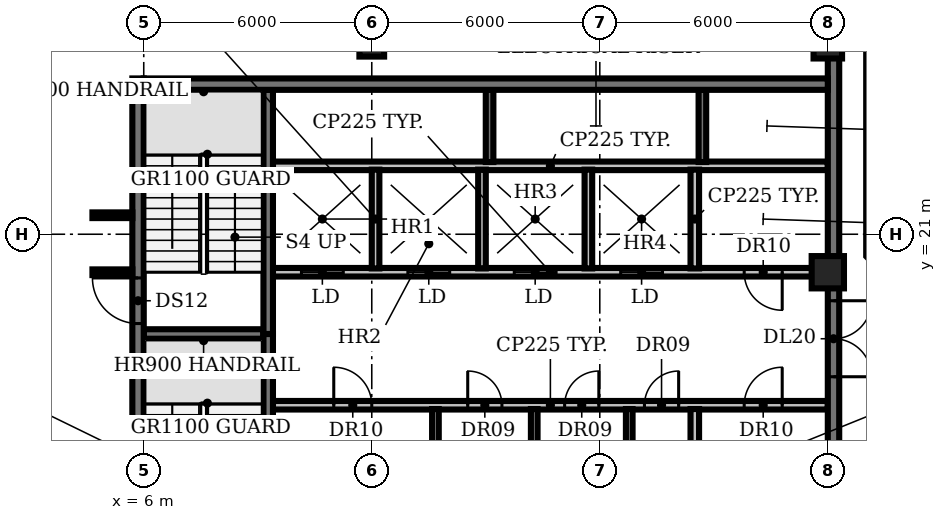
"""IFC4 building model, lengths in metres.
Left out: names, types, materials, properties, quantities, classifications, styles, units other than length and angle.
Written with IfcOpenShell. Run it as: python <this file> out.ifc"""

import sys

from ifc_helpers import new_model, si_unit, direction, frame, frame_2d, origin, origin_2d, place, context, subcontext, project, spatial, rectangle, circle, extrude, element, fill, save


model = new_model("IFC4")
c1 = context("Model", 3, precision=1e-05, world=origin(), true_north=direction((0.0, 1.0)))
c2 = subcontext(c1, "Body", "Model", "MODEL_VIEW")
j1 = project(units=[si_unit("LENGTHUNIT", "METRE"), si_unit("PLANEANGLEUNIT", "RADIAN")], contexts=[c1])
p1 = place(None, origin())
s1 = spatial("IfcSite", under=j1, at=p1, CompositionType="ELEMENT")
p2 = place(p1, origin())
s2 = spatial("IfcBuilding", under=s1, at=p2, CompositionType="ELEMENT")
p3 = place(p2, frame((0.0, 0.0, 276.8)))
s3 = spatial("IfcBuildingStorey", under=s2, at=p3, CompositionType="ELEMENT", Elevation=276.8)
p4 = place(p3, frame((12.0, 26.0, 0.0), z_axis=(0.0, 0.0, 1.0), x_axis=(1.0, 0.0, 0.0)))
e1 = element("IfcColumn", 1, at=p4, inside=s3, PredefinedType="COLUMN", context=c2, shape_type="SweptSolid", body=[
    extrude(rectangle(XDim=0.65, YDim=0.65, at=origin_2d()), origin(), (0.0, 0.0, 1.0), 3.85),
])
p5 = place(p3, frame((24.0, 20.0, 0.0), z_axis=(0.0, 0.0, 1.0), x_axis=(1.0, 0.0, 0.0)))
e2 = element("IfcColumn", 2, at=p5, inside=s3, PredefinedType="COLUMN", context=c2, shape_type="SweptSolid", body=[
    extrude(circle(Radius=0.425, at=origin_2d()), origin(), (0.0, 0.0, 1.0), 3.85),
])
p6 = place(p3, frame((24.0, 26.0, 0.0), z_axis=(0.0, 0.0, 1.0), x_axis=(1.0, 0.0, 0.0)))
e3 = element("IfcColumn", 3, at=p6, inside=s3, PredefinedType="COLUMN", context=c2, shape_type="SweptSolid", body=[
    extrude(rectangle(XDim=0.75, YDim=0.75, at=origin_2d()), origin(), (0.0, 0.0, 1.0), 3.85),
])
p7 = place(p3, frame((9.4, 16.5, 0.0), z_axis=(0.0, 0.0, 1.0), x_axis=(1.0, 0.0, 0.0)))
e4 = element("IfcWall", 4, at=p7, inside=s3, PredefinedType="PARTITIONING", context=c2, shape_type="SweptSolid", body=[
    extrude(rectangle(XDim=14.6, YDim=0.225, at=frame_2d((7.3, 0.0))), origin(), (0.0, 0.0, 1.0), 3.85),
])
p8 = place(p7, frame((1.6, 0.0, 0.0)))
e5 = element("IfcOpeningElement", 5, at=p8, cuts=e4, PredefinedType="OPENING", context=c2, shape_type="SweptSolid", body=[
    extrude(rectangle(XDim=1.0, YDim=2.1, at=frame_2d((0.5, 1.05))), frame((0.0, 0.123, 0.0), z_axis=(0.0, -1.0, 0.0), x_axis=(1.0, 0.0, 0.0)), (0.0, 0.0, 1.0), 0.245),
])
p9 = place(p7, frame((5.125, 0.0, 0.0)))
e6 = element("IfcOpeningElement", 6, at=p9, cuts=e4, PredefinedType="OPENING", context=c2, shape_type="SweptSolid", body=[
    extrude(rectangle(XDim=0.9, YDim=2.1, at=frame_2d((0.45, 1.05))), frame((0.0, 0.123, 0.0), z_axis=(0.0, -1.0, 0.0), x_axis=(1.0, 0.0, 0.0)), (0.0, 0.0, 1.0), 0.245),
])
p10 = place(p7, frame((7.675, 0.0, 0.0)))
e7 = element("IfcOpeningElement", 7, at=p10, cuts=e4, PredefinedType="OPENING", context=c2, shape_type="SweptSolid", body=[
    extrude(rectangle(XDim=0.9, YDim=2.1, at=frame_2d((0.45, 1.05))), frame((0.0, 0.123, 0.0), z_axis=(0.0, -1.0, 0.0), x_axis=(1.0, 0.0, 0.0)), (0.0, 0.0, 1.0), 0.245),
])
p11 = place(p7, frame((9.775, 0.0, 0.0)))
e8 = element("IfcOpeningElement", 8, at=p11, cuts=e4, PredefinedType="OPENING", context=c2, shape_type="SweptSolid", body=[
    extrude(rectangle(XDim=0.9, YDim=2.1, at=frame_2d((0.45, 1.05))), frame((0.0, 0.123, 0.0), z_axis=(0.0, -1.0, 0.0), x_axis=(1.0, 0.0, 0.0)), (0.0, 0.0, 1.0), 0.245),
])
p12 = place(p7, frame((12.4, 0.0, 0.0)))
e9 = element("IfcOpeningElement", 9, at=p12, cuts=e4, PredefinedType="OPENING", context=c2, shape_type="SweptSolid", body=[
    extrude(rectangle(XDim=1.0, YDim=2.1, at=frame_2d((0.5, 1.05))), frame((0.0, 0.123, 0.0), z_axis=(0.0, -1.0, 0.0), x_axis=(1.0, 0.0, 0.0)), (0.0, 0.0, 1.0), 0.245),
])
p13 = place(p3, frame((6.0, 18.375, 0.0), z_axis=(0.0, 0.0, 1.0), x_axis=(1.0, 0.0, 0.0)))
e10 = element("IfcWall", 10, at=p13, inside=s3, PredefinedType="SHEAR", context=c2, shape_type="SweptSolid", body=[
    extrude(rectangle(XDim=3.15, YDim=0.25, at=frame_2d((1.575, 0.0))), origin(), (0.0, 0.0, 1.0), 3.85),
])
p14 = place(p3, frame((24.0, 20.0, 0.0), z_axis=(0.0, 0.0, 1.0), x_axis=(-1.0, 0.0, 0.0)))
e11 = element("IfcWall", 11, at=p14, inside=s3, PredefinedType="PARTITIONING", context=c2, shape_type="SweptSolid", body=[
    extrude(rectangle(XDim=14.6, YDim=0.225, at=frame_2d((7.3, 0.0))), origin(), (0.0, 0.0, 1.0), 3.85),
])
p15 = place(p14, frame((12.75, 0.0, 0.0)))
e12 = element("IfcOpeningElement", 12, at=p15, cuts=e11, PredefinedType="OPENING", context=c2, shape_type="SweptSolid", body=[
    extrude(rectangle(XDim=1.1, YDim=2.1, at=frame_2d((0.55, 1.05))), frame((0.0, 0.123, 0.0), z_axis=(0.0, -1.0, 0.0), x_axis=(1.0, 0.0, 0.0)), (0.0, 0.0, 1.0), 0.245),
])
p16 = place(p14, frame((9.95, 0.0, 0.0)))
e13 = element("IfcOpeningElement", 13, at=p16, cuts=e11, PredefinedType="OPENING", context=c2, shape_type="SweptSolid", body=[
    extrude(rectangle(XDim=1.1, YDim=2.1, at=frame_2d((0.55, 1.05))), frame((0.0, 0.123, 0.0), z_axis=(0.0, -1.0, 0.0), x_axis=(1.0, 0.0, 0.0)), (0.0, 0.0, 1.0), 0.245),
])
p17 = place(p14, frame((7.15, 0.0, 0.0)))
e14 = element("IfcOpeningElement", 14, at=p17, cuts=e11, PredefinedType="OPENING", context=c2, shape_type="SweptSolid", body=[
    extrude(rectangle(XDim=1.1, YDim=2.1, at=frame_2d((0.55, 1.05))), frame((0.0, 0.123, 0.0), z_axis=(0.0, -1.0, 0.0), x_axis=(1.0, 0.0, 0.0)), (0.0, 0.0, 1.0), 0.245),
])
p18 = place(p14, frame((4.35, 0.0, 0.0)))
e15 = element("IfcOpeningElement", 15, at=p18, cuts=e11, PredefinedType="OPENING", context=c2, shape_type="SweptSolid", body=[
    extrude(rectangle(XDim=1.1, YDim=2.1, at=frame_2d((0.55, 1.05))), frame((0.0, 0.123, 0.0), z_axis=(0.0, -1.0, 0.0), x_axis=(1.0, 0.0, 0.0)), (0.0, 0.0, 1.0), 0.245),
])
p19 = place(p14, frame((1.2, 0.0, 0.0)))
e16 = element("IfcOpeningElement", 16, at=p19, cuts=e11, PredefinedType="OPENING", context=c2, shape_type="SweptSolid", body=[
    extrude(rectangle(XDim=1.0, YDim=2.1, at=frame_2d((0.5, 1.05))), frame((0.0, 0.123, 0.0), z_axis=(0.0, -1.0, 0.0), x_axis=(1.0, 0.0, 0.0)), (0.0, 0.0, 1.0), 0.245),
])
p20 = place(p3, frame((9.4, 22.8, 0.0), z_axis=(0.0, 0.0, 1.0), x_axis=(1.0, 0.0, 0.0)))
e17 = element("IfcWall", 17, at=p20, inside=s3, PredefinedType="PARTITIONING", context=c2, shape_type="SweptSolid", body=[
    extrude(rectangle(XDim=14.6, YDim=0.225, at=frame_2d((7.3, 0.0))), origin(), (0.0, 0.0, 1.0), 3.85),
])
p21 = place(p3, frame((9.275, 18.375, 0.0), z_axis=(0.0, 0.0, 1.0), x_axis=(0.0, -1.0, 0.0)))
e18 = element("IfcWall", 18, at=p21, inside=s3, PredefinedType="SHEAR", context=c2, shape_type="SweptSolid", body=[
    extrude(rectangle(XDim=6.55, YDim=0.25, at=frame_2d((3.275, 0.0))), origin(), (0.0, 0.0, 1.0), 3.85),
])
p22 = place(p21, frame((5.075, 0.0, 0.0)))
e19 = element("IfcOpeningElement", 19, at=p22, cuts=e18, PredefinedType="OPENING", context=c2, shape_type="SweptSolid", body=[
    extrude(rectangle(XDim=1.0, YDim=2.1, at=frame_2d((0.5, 1.05))), frame((0.0, 0.135, 0.0), z_axis=(0.0, -1.0, 0.0), x_axis=(1.0, 0.0, 0.0)), (0.0, 0.0, 1.0), 0.27),
])
p23 = place(p3, frame((9.275, 18.375, 0.0), z_axis=(0.0, 0.0, 1.0), x_axis=(0.0, 1.0, 0.0)))
e20 = element("IfcWall", 20, at=p23, inside=s3, PredefinedType="SHEAR", context=c2, shape_type="SweptSolid", body=[
    extrude(rectangle(XDim=6.425, YDim=0.25, at=frame_2d((3.212, 0.0))), origin(), (0.0, 0.0, 1.0), 3.85),
])
p24 = place(p3, frame((12.1, 20.1, 0.0), z_axis=(0.0, 0.0, 1.0), x_axis=(0.0, 1.0, 0.0)))
e21 = element("IfcWall", 21, at=p24, inside=s3, PredefinedType="SOLIDWALL", context=c2, shape_type="SweptSolid", body=[
    extrude(rectangle(XDim=2.6, YDim=0.2, at=frame_2d((1.3, 0.0))), origin(), (0.0, 0.0, 1.0), 3.85),
])
p25 = place(p3, frame((13.675, 13.8, 0.0), z_axis=(0.0, 0.0, 1.0), x_axis=(0.0, 1.0, 0.0)))
e22 = element("IfcWall", 22, at=p25, inside=s3, PredefinedType="PARTITIONING", context=c2, shape_type="SweptSolid", body=[
    extrude(rectangle(XDim=2.6, YDim=0.175, at=frame_2d((1.3, 0.0))), origin(), (0.0, 0.0, 1.0), 3.85),
])
p26 = place(p3, frame((14.9, 20.1, 0.0), z_axis=(0.0, 0.0, 1.0), x_axis=(0.0, 1.0, 0.0)))
e23 = element("IfcWall", 23, at=p26, inside=s3, PredefinedType="SOLIDWALL", context=c2, shape_type="SweptSolid", body=[
    extrude(rectangle(XDim=2.6, YDim=0.2, at=frame_2d((1.3, 0.0))), origin(), (0.0, 0.0, 1.0), 3.85),
])
p27 = place(p3, frame((15.1, 22.9, 0.0), z_axis=(0.0, 0.0, 1.0), x_axis=(0.0, 1.0, 0.0)))
e24 = element("IfcWall", 24, at=p27, inside=s3, PredefinedType="SHEAR", context=c2, shape_type="SweptSolid", body=[
    extrude(rectangle(XDim=1.9, YDim=0.2, at=frame_2d((0.95, 0.0))), origin(), (0.0, 0.0, 1.0), 3.85),
])
p28 = place(p3, frame((16.275, 13.8, 0.0), z_axis=(0.0, 0.0, 1.0), x_axis=(0.0, 1.0, 0.0)))
e25 = element("IfcWall", 25, at=p28, inside=s3, PredefinedType="PARTITIONING", context=c2, shape_type="SweptSolid", body=[
    extrude(rectangle(XDim=2.6, YDim=0.175, at=frame_2d((1.3, 0.0))), origin(), (0.0, 0.0, 1.0), 3.85),
])
p29 = place(p3, frame((17.7, 20.1, 0.0), z_axis=(0.0, 0.0, 1.0), x_axis=(0.0, 1.0, 0.0)))
e26 = element("IfcWall", 26, at=p29, inside=s3, PredefinedType="SOLIDWALL", context=c2, shape_type="SweptSolid", body=[
    extrude(rectangle(XDim=2.6, YDim=0.2, at=frame_2d((1.3, 0.0))), origin(), (0.0, 0.0, 1.0), 3.85),
])
p30 = place(p3, frame((18.775, 13.8, 0.0), z_axis=(0.0, 0.0, 1.0), x_axis=(0.0, 1.0, 0.0)))
e27 = element("IfcWall", 27, at=p30, inside=s3, PredefinedType="PARTITIONING", context=c2, shape_type="SweptSolid", body=[
    extrude(rectangle(XDim=2.6, YDim=0.175, at=frame_2d((1.3, 0.0))), origin(), (0.0, 0.0, 1.0), 3.85),
])
for number, where, z_axis, x_axis in (
    (28, (20.5, 13.8, 0.0), (0.0, 0.0, 1.0), (0.0, 1.0, 0.0)),
    (29, (20.5, 20.1, 0.0), (0.0, 0.0, 1.0), (0.0, 1.0, 0.0)),
):
    element("IfcWall", number, at=place(p3, frame(where, z_axis=z_axis, x_axis=x_axis)), inside=s3, PredefinedType="PARTITIONING", context=c2, shape_type="SweptSolid", body=[
        extrude(rectangle(XDim=2.6, YDim=0.225, at=frame_2d((1.3, 0.0))), origin(), (0.0, 0.0, 1.0), 3.85),
    ])
p31 = place(p3, frame((20.7, 22.9, 0.0), z_axis=(0.0, 0.0, 1.0), x_axis=(0.0, 1.0, 0.0)))
e30 = element("IfcWall", 30, at=p31, inside=s3, PredefinedType="SHEAR", context=c2, shape_type="SweptSolid", body=[
    extrude(rectangle(XDim=1.9, YDim=0.2, at=frame_2d((0.95, 0.0))), origin(), (0.0, 0.0, 1.0), 3.85),
])
p32 = place(p3, frame((5.85, 5.1, 0.0), z_axis=(0.0, 0.0, 1.0), x_axis=(0.0, 1.0, 0.0)))
e31 = element("IfcWall", 31, at=p32, inside=s3, PredefinedType="SHEAR", context=c2, shape_type="SweptSolid", body=[
    extrude(rectangle(XDim=20.0, YDim=0.3, at=frame_2d((10.0, 0.0))), origin(), (0.0, 0.0, 1.0), 3.85),
])
p33 = place(p32, frame((0.55, 0.0, 0.0)))
e32 = element("IfcOpeningElement", 32, at=p33, cuts=e31, PredefinedType="OPENING", context=c2, shape_type="SweptSolid", body=[
    extrude(rectangle(XDim=1.5, YDim=2.1, at=frame_2d((0.75, 1.05))), frame((0.0, 0.16, 0.0), z_axis=(0.0, -1.0, 0.0), x_axis=(1.0, 0.0, 0.0)), (0.0, 0.0, 1.0), 0.32),
])
p34 = place(p32, frame((7.0, 0.0, 0.0)))
e33 = element("IfcOpeningElement", 33, at=p34, cuts=e31, PredefinedType="OPENING", context=c2, shape_type="SweptSolid", body=[
    extrude(rectangle(XDim=1.2, YDim=2.1, at=frame_2d((0.6, 1.05))), frame((0.0, 0.16, 0.0), z_axis=(0.0, -1.0, 0.0), x_axis=(1.0, 0.0, 0.0)), (0.0, 0.0, 1.0), 0.32),
])
p35 = place(p32, frame((13.55, 0.0, 0.0)))
e34 = element("IfcOpeningElement", 34, at=p35, cuts=e31, PredefinedType="OPENING", context=c2, shape_type="SweptSolid", body=[
    extrude(rectangle(XDim=1.2, YDim=2.1, at=frame_2d((0.6, 1.05))), frame((0.0, 0.16, 0.0), z_axis=(0.0, -1.0, 0.0), x_axis=(1.0, 0.0, 0.0)), (0.0, 0.0, 1.0), 0.32),
])
p36 = place(p3, frame((24.15, 25.655, 0.0), z_axis=(0.0, 0.0, 1.0), x_axis=(0.0, -1.0, 0.0)))
e35 = element("IfcWall", 35, at=p36, inside=s3, PredefinedType="SHEAR", context=c2, shape_type="SweptSolid", body=[
    extrude(rectangle(XDim=20.555, YDim=0.3, at=frame_2d((10.277, 0.0))), origin(), (0.0, 0.0, 1.0), 3.85),
])
p37 = place(p36, frame((18.505, 0.0, 0.0)))
e36 = element("IfcOpeningElement", 36, at=p37, cuts=e35, PredefinedType="OPENING", context=c2, shape_type="SweptSolid", body=[
    extrude(rectangle(XDim=1.5, YDim=2.1, at=frame_2d((0.75, 1.05))), frame((0.0, 0.16, 0.0), z_axis=(0.0, -1.0, 0.0), x_axis=(1.0, 0.0, 0.0)), (0.0, 0.0, 1.0), 0.32),
])
p38 = place(p36, frame((12.405, 0.0, 0.0)))
e37 = element("IfcOpeningElement", 37, at=p38, cuts=e35, PredefinedType="OPENING", context=c2, shape_type="SweptSolid", body=[
    extrude(rectangle(XDim=0.9, YDim=2.1, at=frame_2d((0.45, 1.05))), frame((0.0, 0.16, 0.0), z_axis=(0.0, -1.0, 0.0), x_axis=(1.0, 0.0, 0.0)), (0.0, 0.0, 1.0), 0.32),
])
p39 = place(p36, frame((6.405, 0.0, 0.0)))
e38 = element("IfcOpeningElement", 38, at=p39, cuts=e35, PredefinedType="OPENING", context=c2, shape_type="SweptSolid", body=[
    extrude(rectangle(XDim=2.0, YDim=2.1, at=frame_2d((1.0, 1.05))), frame((0.0, 0.16, 0.0), z_axis=(0.0, -1.0, 0.0), x_axis=(1.0, 0.0, 0.0)), (0.0, 0.0, 1.0), 0.32),
])
p40 = place(p3, frame((6.0, 24.95, 0.0), z_axis=(0.0, 0.0, 1.0), x_axis=(1.0, 0.0, 0.0)))
e39 = element("IfcWall", 39, at=p40, inside=s3, PredefinedType="SHEAR", context=c2, shape_type="SweptSolid", body=[
    extrude(rectangle(XDim=18.0, YDim=0.3, at=frame_2d((9.0, 0.0))), origin(), (0.0, 0.0, 1.0), 3.85),
])
for number, where, z_axis, x_axis in (
    (40, (4.65, 20.0, 0.0), (0.0, 0.0, 1.0), (1.0, 0.0, 0.0)),
    (41, (4.65, 21.5, 0.0), (0.0, 0.0, 1.0), (1.0, 0.0, 0.0)),
):
    element("IfcWall", number, at=place(p3, frame(where, z_axis=z_axis, x_axis=x_axis)), inside=s3, PredefinedType="PARTITIONING", context=c2, shape_type="SweptSolid", body=[
        extrude(rectangle(XDim=1.05, YDim=0.15, at=frame_2d((0.525, 0.0))), origin(), (0.0, 0.0, 1.0), 2.9),
    ])
p41 = place(p8, origin())
e42 = element("IfcDoor", 42, at=p41, inside=s3, OperationType="SINGLE_SWING_LEFT", PredefinedType="DOOR", context=c2, shape_type="SweptSolid", body=[
    extrude(rectangle(XDim=1.0, YDim=2.1, at=frame_2d((0.5, 1.05))), frame((0.0, 0.025, 0.0), z_axis=(0.0, -1.0, 0.0), x_axis=(1.0, 0.0, 0.0)), (0.0, 0.0, 1.0), 0.05),
])
fill(e5, e42)
p42 = place(p9, origin())
e43 = element("IfcDoor", 43, at=p42, inside=s3, OperationType="SINGLE_SWING_LEFT", PredefinedType="DOOR", context=c2, shape_type="SweptSolid", body=[
    extrude(rectangle(XDim=0.9, YDim=2.1, at=frame_2d((0.45, 1.05))), frame((0.0, 0.025, 0.0), z_axis=(0.0, -1.0, 0.0), x_axis=(1.0, 0.0, 0.0)), (0.0, 0.0, 1.0), 0.05),
])
fill(e6, e43)
p43 = place(p10, origin())
e44 = element("IfcDoor", 44, at=p43, inside=s3, OperationType="SINGLE_SWING_RIGHT", PredefinedType="DOOR", context=c2, shape_type="SweptSolid", body=[
    extrude(rectangle(XDim=0.9, YDim=2.1, at=frame_2d((0.45, 1.05))), frame((0.0, 0.025, 0.0), z_axis=(0.0, -1.0, 0.0), x_axis=(1.0, 0.0, 0.0)), (0.0, 0.0, 1.0), 0.05),
])
fill(e7, e44)
p44 = place(p11, origin())
e45 = element("IfcDoor", 45, at=p44, inside=s3, OperationType="SINGLE_SWING_RIGHT", PredefinedType="DOOR", context=c2, shape_type="SweptSolid", body=[
    extrude(rectangle(XDim=0.9, YDim=2.1, at=frame_2d((0.45, 1.05))), frame((0.0, 0.025, 0.0), z_axis=(0.0, -1.0, 0.0), x_axis=(1.0, 0.0, 0.0)), (0.0, 0.0, 1.0), 0.05),
])
fill(e8, e45)
p45 = place(p12, origin())
e46 = element("IfcDoor", 46, at=p45, inside=s3, OperationType="SINGLE_SWING_RIGHT", PredefinedType="DOOR", context=c2, shape_type="SweptSolid", body=[
    extrude(rectangle(XDim=1.0, YDim=2.1, at=frame_2d((0.5, 1.05))), frame((0.0, 0.025, 0.0), z_axis=(0.0, -1.0, 0.0), x_axis=(1.0, 0.0, 0.0)), (0.0, 0.0, 1.0), 0.05),
])
fill(e9, e46)
p46 = place(p15, origin())
e47 = element("IfcDoor", 47, at=p46, inside=s3, OperationType="DOUBLE_DOOR_SLIDING", PredefinedType="DOOR", context=c2, shape_type="SweptSolid", body=[
    extrude(rectangle(XDim=1.1, YDim=2.1, at=frame_2d((0.55, 1.05))), frame((0.0, 0.025, 0.0), z_axis=(0.0, -1.0, 0.0), x_axis=(1.0, 0.0, 0.0)), (0.0, 0.0, 1.0), 0.05),
])
fill(e12, e47)
p47 = place(p16, origin())
e48 = element("IfcDoor", 48, at=p47, inside=s3, OperationType="DOUBLE_DOOR_SLIDING", PredefinedType="DOOR", context=c2, shape_type="SweptSolid", body=[
    extrude(rectangle(XDim=1.1, YDim=2.1, at=frame_2d((0.55, 1.05))), frame((0.0, 0.025, 0.0), z_axis=(0.0, -1.0, 0.0), x_axis=(1.0, 0.0, 0.0)), (0.0, 0.0, 1.0), 0.05),
])
fill(e13, e48)
p48 = place(p17, origin())
e49 = element("IfcDoor", 49, at=p48, inside=s3, OperationType="DOUBLE_DOOR_SLIDING", PredefinedType="DOOR", context=c2, shape_type="SweptSolid", body=[
    extrude(rectangle(XDim=1.1, YDim=2.1, at=frame_2d((0.55, 1.05))), frame((0.0, 0.025, 0.0), z_axis=(0.0, -1.0, 0.0), x_axis=(1.0, 0.0, 0.0)), (0.0, 0.0, 1.0), 0.05),
])
fill(e14, e49)
p49 = place(p18, origin())
e50 = element("IfcDoor", 50, at=p49, inside=s3, OperationType="DOUBLE_DOOR_SLIDING", PredefinedType="DOOR", context=c2, shape_type="SweptSolid", body=[
    extrude(rectangle(XDim=1.1, YDim=2.1, at=frame_2d((0.55, 1.05))), frame((0.0, 0.025, 0.0), z_axis=(0.0, -1.0, 0.0), x_axis=(1.0, 0.0, 0.0)), (0.0, 0.0, 1.0), 0.05),
])
fill(e15, e50)
p50 = place(p19, origin())
e51 = element("IfcDoor", 51, at=p50, inside=s3, OperationType="SINGLE_SWING_LEFT", PredefinedType="DOOR", context=c2, shape_type="SweptSolid", body=[
    extrude(rectangle(XDim=1.0, YDim=2.1, at=frame_2d((0.5, 1.05))), frame((0.0, 0.025, 0.0), z_axis=(0.0, -1.0, 0.0), x_axis=(1.0, 0.0, 0.0)), (0.0, 0.0, 1.0), 0.05),
])
fill(e16, e51)
p51 = place(p35, origin())
e52 = element("IfcDoor", 52, at=p51, inside=s3, OperationType="SINGLE_SWING_RIGHT", PredefinedType="DOOR", context=c2, shape_type="SweptSolid", body=[
    extrude(rectangle(XDim=1.2, YDim=2.1, at=frame_2d((0.6, 1.05))), frame((0.0, 0.025, 0.0), z_axis=(0.0, -1.0, 0.0), x_axis=(1.0, 0.0, 0.0)), (0.0, 0.0, 1.0), 0.05),
])
fill(e34, e52)
p52 = place(p39, origin())
e53 = element("IfcDoor", 53, at=p52, inside=s3, OperationType="DOUBLE_DOOR_SINGLE_SWING", PredefinedType="DOOR", context=c2, shape_type="SweptSolid", body=[
    extrude(rectangle(XDim=2.0, YDim=2.1, at=frame_2d((1.0, 1.05))), frame((0.0, 0.025, 0.0), z_axis=(0.0, -1.0, 0.0), x_axis=(1.0, 0.0, 0.0)), (0.0, 0.0, 1.0), 0.05),
])
fill(e38, e53)
save(model, sys.argv[1])
